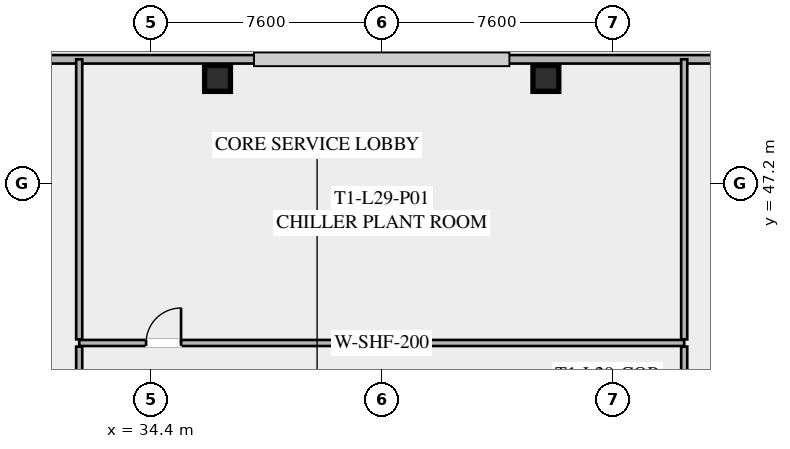
"""IFC4 building model, lengths in metres.
Left out: names, types, materials, properties, quantities, classifications, styles, units other than length and angle.
Written with IfcOpenShell. Run it as: python <this file> out.ifc"""

import sys

from ifc_helpers import new_model, si_unit, direction, frame, frame_2d, origin, origin_2d, place, context, subcontext, project, spatial, rectangle, hollow_rectangle, extrude, element, fill, save


model = new_model("IFC4")
c1 = context("Model", 3, precision=1e-05, world=origin(), true_north=direction((0.0, 1.0)))
c2 = subcontext(c1, "Body", "Model", "MODEL_VIEW")
j1 = project(units=[si_unit("LENGTHUNIT", "METRE"), si_unit("PLANEANGLEUNIT", "RADIAN")], contexts=[c1])
p1 = place(None, origin())
s1 = spatial("IfcSite", under=j1, at=p1, CompositionType="ELEMENT")
p2 = place(p1, origin())
s2 = spatial("IfcBuilding", under=s1, at=p2, CompositionType="ELEMENT")
p3 = place(p2, frame((0.0, 0.0, 109.8)))
s3 = spatial("IfcBuildingStorey", under=s2, at=p3, CompositionType="ELEMENT", Elevation=109.8)
for number, where, z_axis, x_axis in (
    (1, (47.4, 50.65, -0.295), (0.0, 0.0, 1.0), (1.0, 0.0, 0.0)),
    (2, (36.6, 50.65, -0.295), (0.0, 0.0, 1.0), (1.0, 0.0, 0.0)),
):
    element("IfcColumn", number, at=place(p3, frame(where, z_axis=z_axis, x_axis=x_axis)), inside=s3, PredefinedType="COLUMN", context=c2, shape_type="SweptSolid", body=[
        extrude(hollow_rectangle(XDim=0.85, YDim=0.85, WallThickness=0.035, at=origin_2d()), origin(), (0.0, 0.0, 1.0), 4.715),
    ])
p4 = place(p3, frame((25.22, 51.28, 0.0), z_axis=(0.0, 0.0, 1.0), x_axis=(1.0, 0.0, 0.0)))
e3 = element("IfcWall", 3, at=p4, inside=s3, PredefinedType="SOLIDWALL", context=c2, shape_type="SweptSolid", body=[
    extrude(rectangle(XDim=33.56, YDim=0.28, at=frame_2d((16.78, 0.0))), origin(), (0.0, 0.0, 1.0), 4.42),
])
p5 = place(p3, frame((32.05, 41.95, 0.0), z_axis=(0.0, 0.0, 1.0), x_axis=(1.0, 0.0, 0.0)))
e4 = element("IfcWall", 4, at=p5, inside=s3, PredefinedType="SOLIDWALL", context=c2, shape_type="SweptSolid", body=[
    extrude(rectangle(XDim=19.9, YDim=0.2, at=frame_2d((9.95, 0.0))), origin(), (0.0, 0.0, 1.0), 3.531),
])
p6 = place(p5, frame((2.2, 0.0, 0.0)))
e5 = element("IfcOpeningElement", 5, at=p6, cuts=e4, PredefinedType="OPENING", context=c2, shape_type="SweptSolid", body=[
    extrude(rectangle(XDim=1.15, YDim=2.2, at=frame_2d((0.575, 1.1))), frame((0.0, 0.11, 0.0), z_axis=(0.0, -1.0, 0.0), x_axis=(1.0, 0.0, 0.0)), (0.0, 0.0, 1.0), 0.22),
])
p7 = place(p3, frame((51.95, 41.83, 0.0), z_axis=(0.0, 0.0, 1.0), x_axis=(0.0, -1.0, 0.0)))
e6 = element("IfcWall", 6, at=p7, inside=s3, PredefinedType="SOLIDWALL", context=c2, shape_type="SweptSolid", body=[
    extrude(rectangle(XDim=19.66, YDim=0.2, at=frame_2d((9.83, 0.0))), origin(), (0.0, 0.0, 1.0), 3.531),
])
p8 = place(p7, frame((3.0, 0.0, 0.0)))
e7 = element("IfcOpeningElement", 7, at=p8, cuts=e6, PredefinedType="OPENING", context=c2, shape_type="SweptSolid", body=[
    extrude(rectangle(XDim=1.25, YDim=2.25, at=frame_2d((0.625, 1.125))), frame((0.0, 0.11, 0.0), z_axis=(0.0, -1.0, 0.0), x_axis=(1.0, 0.0, 0.0)), (0.0, 0.0, 1.0), 0.22),
])
p9 = place(p7, frame((13.2, 0.0, 0.0)))
e8 = element("IfcOpeningElement", 8, at=p9, cuts=e6, PredefinedType="OPENING", context=c2, shape_type="SweptSolid", body=[
    extrude(rectangle(XDim=1.15, YDim=2.2, at=frame_2d((0.575, 1.1))), frame((0.0, 0.11, 0.0), z_axis=(0.0, -1.0, 0.0), x_axis=(1.0, 0.0, 0.0)), (0.0, 0.0, 1.0), 0.22),
])
p10 = place(p3, frame((32.05, 35.4, 0.0), z_axis=(0.0, 0.0, 1.0), x_axis=(0.0, 1.0, 0.0)))
e9 = element("IfcWall", 9, at=p10, inside=s3, PredefinedType="SOLIDWALL", context=c2, shape_type="SweptSolid", body=[
    extrude(rectangle(XDim=6.43, YDim=0.2, at=frame_2d((3.215, 0.0))), origin(), (0.0, 0.0, 1.0), 3.531),
])
p11 = place(p10, frame((3.0, 0.0, 0.0)))
e10 = element("IfcOpeningElement", 10, at=p11, cuts=e9, PredefinedType="OPENING", context=c2, shape_type="SweptSolid", body=[
    extrude(rectangle(XDim=1.15, YDim=2.2, at=frame_2d((0.575, 1.1))), frame((0.0, 0.11, 0.0), z_axis=(0.0, -1.0, 0.0), x_axis=(1.0, 0.0, 0.0)), (0.0, 0.0, 1.0), 0.22),
])
for number, where, z_axis, x_axis in (
    (11, (32.05, 42.07, 0.0), (0.0, 0.0, 1.0), (0.0, 1.0, 0.0)),
    (12, (51.95, 42.07, 0.0), (0.0, 0.0, 1.0), (0.0, 1.0, 0.0)),
):
    element("IfcWall", number, at=place(p3, frame(where, z_axis=z_axis, x_axis=x_axis)), inside=s3, PredefinedType="SOLIDWALL", context=c2, shape_type="SweptSolid", body=[
        extrude(rectangle(XDim=9.21, YDim=0.2, at=frame_2d((4.605, 0.0))), origin(), (0.0, 0.0, 1.0), 3.531),
    ])
p12 = place(p6, origin())
e13 = element("IfcDoor", 13, at=p12, inside=s3, OperationType="SINGLE_SWING_RIGHT", PredefinedType="DOOR", context=c2, shape_type="SweptSolid", body=[
    extrude(rectangle(XDim=1.15, YDim=2.2, at=frame_2d((0.575, 1.1))), frame((0.0, 0.025, 0.0), z_axis=(0.0, -1.0, 0.0), x_axis=(1.0, 0.0, 0.0)), (0.0, 0.0, 1.0), 0.05),
])
fill(e5, e13)
save(model, sys.argv[1])
